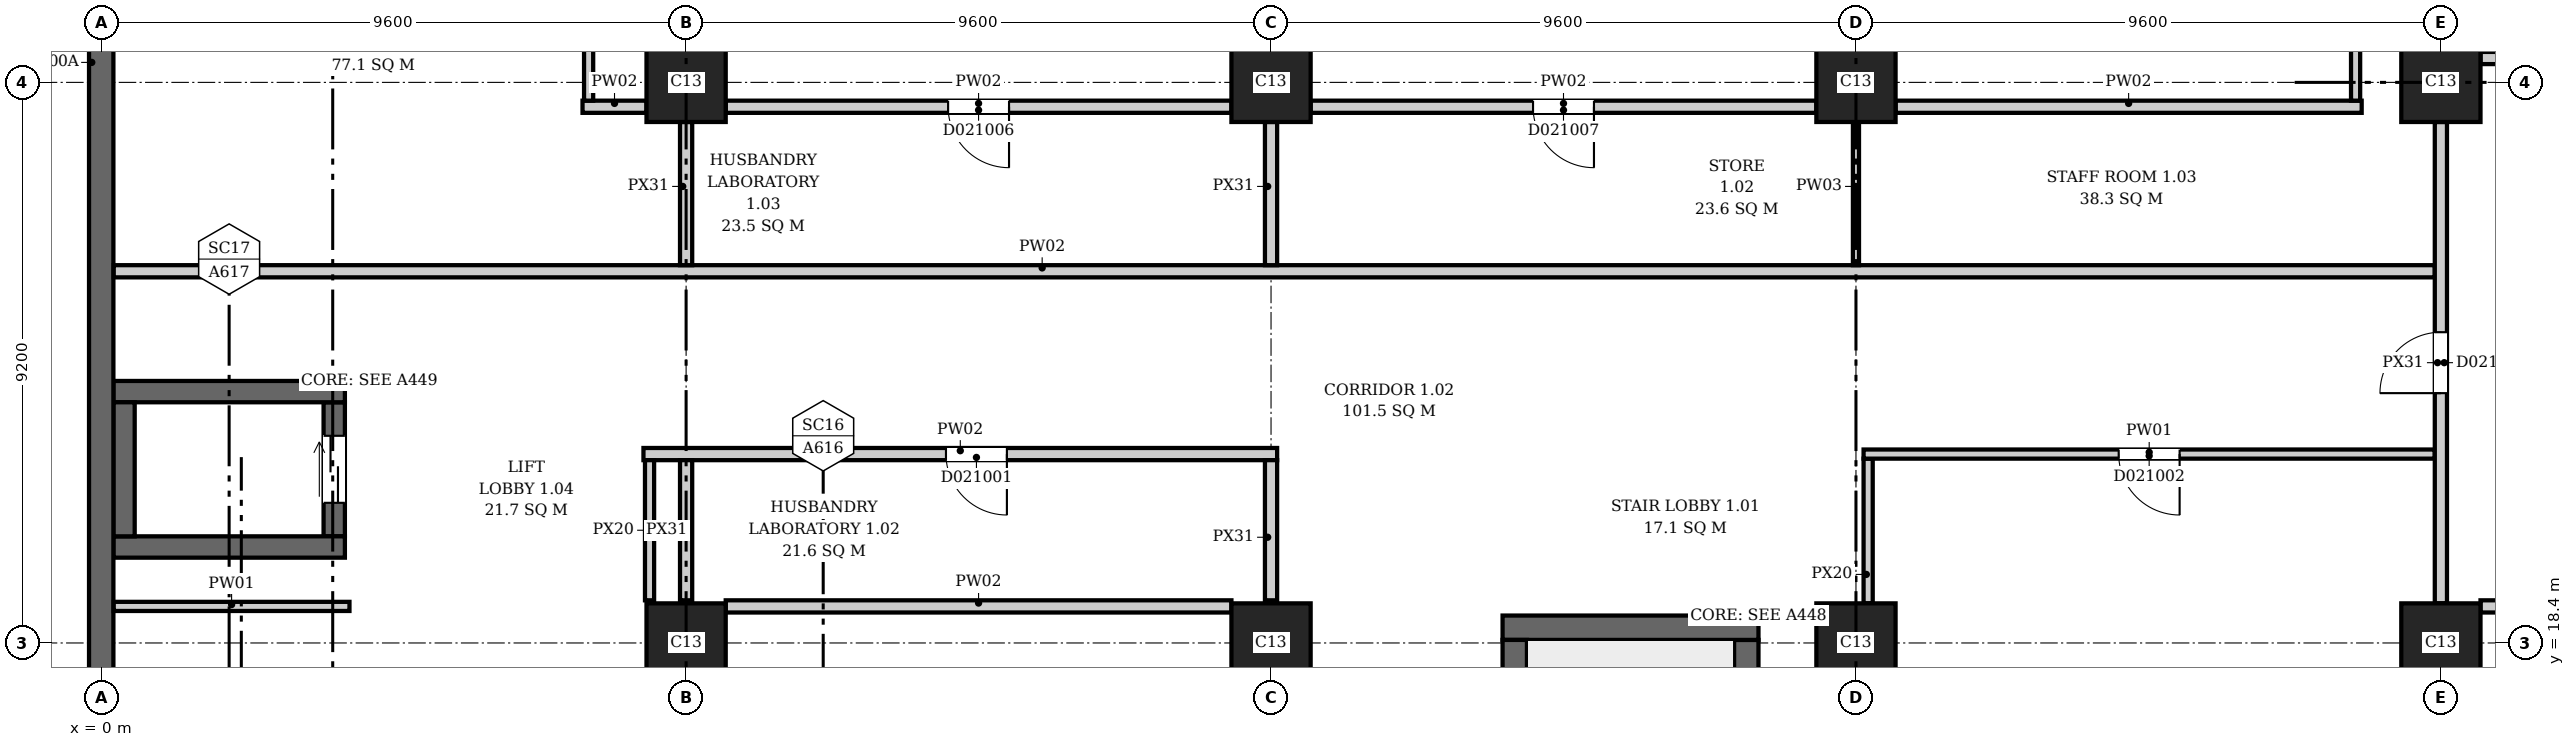
"""IFC4 building model, lengths in metres.
Left out: names, types, materials, properties, quantities, classifications, styles, units other than length and angle.
Written with IfcOpenShell. Run it as: python <this file> out.ifc"""

import sys

from ifc_helpers import new_model, si_unit, direction, frame, frame_2d, origin, origin_2d, place, context, subcontext, project, spatial, rectangle, extrude, element, fill, save


model = new_model("IFC4")
c1 = context("Model", 3, precision=1e-05, world=origin(), true_north=direction((0.0, 1.0)))
c2 = subcontext(c1, "Body", "Model", "MODEL_VIEW")
j1 = project(units=[si_unit("LENGTHUNIT", "METRE"), si_unit("PLANEANGLEUNIT", "RADIAN")], contexts=[c1])
p1 = place(None, origin())
s1 = spatial("IfcSite", under=j1, at=p1, CompositionType="ELEMENT")
p2 = place(p1, origin())
s2 = spatial("IfcBuilding", under=s1, at=p2, CompositionType="ELEMENT")
p3 = place(p2, frame((0.0, 0.0, 6.5)))
s3 = spatial("IfcBuildingStorey", under=s2, at=p3, CompositionType="ELEMENT", Elevation=6.5)
p4 = place(p3, frame((0.0, -0.2, 0.0), z_axis=(0.0, 0.0, 1.0), x_axis=(0.0, 1.0, 0.0)))
e1 = element("IfcWall", 1, at=p4, inside=s3, PredefinedType="SHEAR", context=c2, shape_type="SweptSolid", body=[
    extrude(rectangle(XDim=46.88, YDim=0.4, at=frame_2d((23.44, 0.0))), origin(), (0.0, 0.0, 1.0), 7.7),
])
p5 = place(p3, frame((23.0, 18.65, 0.0), z_axis=(0.0, 0.0, 1.0), x_axis=(1.0, 0.0, 0.0)))
e2 = element("IfcWall", 2, at=p5, inside=s3, PredefinedType="SHEAR", context=c2, shape_type="SweptSolid", body=[
    extrude(rectangle(XDim=4.2, YDim=0.4, at=frame_2d((2.1, 0.0))), origin(), (0.0, 0.0, 1.0), 7.7),
])
for number, where, z_axis, x_axis in (
    (3, (23.2, 11.85, 0.0), (0.0, 0.0, 1.0), (0.0, 1.0, 0.0)),
    (4, (27.0, 11.85, 0.0), (0.0, 0.0, 1.0), (0.0, 1.0, 0.0)),
):
    element("IfcWall", number, at=place(p3, frame(where, z_axis=z_axis, x_axis=x_axis)), inside=s3, PredefinedType="SHEAR", context=c2, shape_type="SweptSolid", body=[
        extrude(rectangle(XDim=6.6, YDim=0.4, at=frame_2d((3.3, 0.0))), origin(), (0.0, 0.0, 1.0), 7.7),
    ])
for number, where, z_axis, x_axis in (
    (5, (0.2, 19.975, 0.0), (0.0, 0.0, 1.0), (1.0, 0.0, 0.0)),
    (6, (0.2, 22.525, 0.0), (0.0, 0.0, 1.0), (1.0, 0.0, 0.0)),
):
    element("IfcWall", number, at=place(p3, frame(where, z_axis=z_axis, x_axis=x_axis)), inside=s3, PredefinedType="SHEAR", context=c2, shape_type="SweptSolid", body=[
        extrude(rectangle(XDim=3.8, YDim=0.35, at=frame_2d((1.9, 0.0))), origin(), (0.0, 0.0, 1.0), 7.7),
    ])
p6 = place(p3, frame((0.375, 20.15, 0.0), z_axis=(0.0, 0.0, 1.0), x_axis=(0.0, 1.0, 0.0)))
e7 = element("IfcWall", 7, at=p6, inside=s3, PredefinedType="SHEAR", context=c2, shape_type="SweptSolid", body=[
    extrude(rectangle(XDim=2.2, YDim=0.35, at=frame_2d((1.1, 0.0))), origin(), (0.0, 0.0, 1.0), 7.7),
])
p7 = place(p3, frame((3.825, 20.15, 0.0), z_axis=(0.0, 0.0, 1.0), x_axis=(0.0, 1.0, 0.0)))
e8 = element("IfcWall", 8, at=p7, inside=s3, PredefinedType="SHEAR", context=c2, shape_type="SweptSolid", body=[
    extrude(rectangle(XDim=2.2, YDim=0.35, at=frame_2d((1.1, 0.0))), origin(), (0.0, 0.0, 1.0), 7.7),
])
p8 = place(p7, frame((0.55, 0.0, 0.0)))
e9 = element("IfcOpeningElement", 9, at=p8, cuts=e8, PredefinedType="OPENING", context=c2, shape_type="SweptSolid", body=[
    extrude(rectangle(XDim=1.1, YDim=2.1, at=frame_2d((0.55, 1.05))), frame((0.0, 0.185, 0.0), z_axis=(0.0, -1.0, 0.0), x_axis=(1.0, 0.0, 0.0)), (0.0, 0.0, 1.0), 0.37),
])
for number, where, z_axis, x_axis in (
    (10, (9.6, 18.4, 0.0), (0.0, 0.0, 1.0), (1.0, 0.0, 0.0)),
    (11, (19.2, 18.4, 0.0), (0.0, 0.0, 1.0), (1.0, 0.0, 0.0)),
    (12, (28.8, 18.4, 0.0), (0.0, 0.0, 1.0), (1.0, 0.0, 0.0)),
    (13, (38.4, 18.4, 0.0), (0.0, 0.0, 1.0), (1.0, 0.0, 0.0)),
    (14, (9.6, 27.6, 0.0), (0.0, 0.0, 1.0), (1.0, 0.0, 0.0)),
    (15, (19.2, 27.6, 0.0), (0.0, 0.0, 1.0), (1.0, 0.0, 0.0)),
    (16, (28.8, 27.6, 0.0), (0.0, 0.0, 1.0), (1.0, 0.0, 0.0)),
    (17, (38.4, 27.6, 0.0), (0.0, 0.0, 1.0), (1.0, 0.0, 0.0)),
):
    element("IfcColumn", number, at=place(p3, frame(where, z_axis=z_axis, x_axis=x_axis)), inside=s3, PredefinedType="COLUMN", context=c2, shape_type="SweptSolid", body=[
        extrude(rectangle(XDim=1.3, YDim=1.3, at=origin_2d()), origin(), (0.0, 0.0, 1.0), 7.7),
    ])
p9 = place(p3, frame((0.206, 19.0, 0.0), z_axis=(0.0, 0.0, 1.0), x_axis=(1.0, 0.0, 0.0)))
e18 = element("IfcWall", 18, at=p9, inside=s3, PredefinedType="PARTITIONING", context=c2, shape_type="SweptSolid", body=[
    extrude(rectangle(XDim=3.869, YDim=0.15, at=frame_2d((1.935, 0.0))), origin(), (0.0, 0.0, 1.0), 7.35),
])
p10 = place(p3, frame((0.206, 24.5, 0.0), z_axis=(0.0, 0.0, 1.0), x_axis=(1.0, 0.0, 0.0)))
e19 = element("IfcWall", 19, at=p10, inside=s3, PredefinedType="PARTITIONING", context=c2, shape_type="SweptSolid", body=[
    extrude(rectangle(XDim=38.094, YDim=0.2, at=frame_2d((19.047, 0.0))), origin(), (0.0, 0.0, 1.0), 7.35),
])
p11 = place(p3, frame((7.9, 27.2, 0.0), z_axis=(0.0, 0.0, 1.0), x_axis=(1.0, 0.0, 0.0)))
e20 = element("IfcWall", 20, at=p11, inside=s3, PredefinedType="PARTITIONING", context=c2, shape_type="SweptSolid", body=[
    extrude(rectangle(XDim=1.05, YDim=0.2, at=frame_2d((0.525, 0.0))), origin(), (0.0, 0.0, 1.0), 7.35),
])
p12 = place(p3, frame((8.0, 27.3, 0.0), z_axis=(0.0, 0.0, 1.0), x_axis=(0.0, 1.0, 0.0)))
e21 = element("IfcWall", 21, at=p12, inside=s3, PredefinedType="PARTITIONING", context=c2, shape_type="SweptSolid", body=[
    extrude(rectangle(XDim=3.625, YDim=0.15, at=frame_2d((1.812, 0.0))), origin(), (0.0, 0.0, 1.0), 7.35),
])
p13 = place(p3, frame((8.9, 21.5, 0.0), z_axis=(0.0, 0.0, 1.0), x_axis=(1.0, 0.0, 0.0)))
e22 = element("IfcWall", 22, at=p13, inside=s3, PredefinedType="PARTITIONING", context=c2, shape_type="SweptSolid", body=[
    extrude(rectangle(XDim=10.4, YDim=0.2, at=frame_2d((5.2, 0.0))), origin(), (0.0, 0.0, 1.0), 7.35),
])
p14 = place(p13, frame((4.965, 0.0, 0.0)))
e23 = element("IfcOpeningElement", 23, at=p14, cuts=e22, PredefinedType="OPENING", context=c2, shape_type="SweptSolid", body=[
    extrude(rectangle(XDim=1.0, YDim=2.1, at=frame_2d((0.5, 1.05))), frame((0.0, 0.11, 0.0), z_axis=(0.0, -1.0, 0.0), x_axis=(1.0, 0.0, 0.0)), (0.0, 0.0, 1.0), 0.22),
])
p15 = place(p3, frame((9.0, 19.1, 0.0), z_axis=(0.0, 0.0, 1.0), x_axis=(0.0, 1.0, 0.0)))
e24 = element("IfcWall", 24, at=p15, inside=s3, PredefinedType="PARTITIONING", context=c2, shape_type="SweptSolid", body=[
    extrude(rectangle(XDim=2.3, YDim=0.15, at=frame_2d((1.15, 0.0))), origin(), (0.0, 0.0, 1.0), 6.95),
])
p16 = place(p3, frame((9.6, 19.1, 0.0), z_axis=(0.0, 0.0, 1.0), x_axis=(0.0, 1.0, 0.0)))
e25 = element("IfcWall", 25, at=p16, inside=s3, PredefinedType="PARTITIONING", context=c2, shape_type="SweptSolid", body=[
    extrude(rectangle(XDim=2.3, YDim=0.2, at=frame_2d((1.15, 0.0))), origin(), (0.0, 0.0, 1.0), 6.95),
])
p17 = place(p3, frame((9.6, 24.6, 0.0), z_axis=(0.0, 0.0, 1.0), x_axis=(0.0, 1.0, 0.0)))
e26 = element("IfcWall", 26, at=p17, inside=s3, PredefinedType="PARTITIONING", context=c2, shape_type="SweptSolid", body=[
    extrude(rectangle(XDim=2.35, YDim=0.2, at=frame_2d((1.175, 0.0))), origin(), (0.0, 0.0, 1.0), 6.95),
])
p18 = place(p3, frame((10.25, 19.0, 0.0), z_axis=(0.0, 0.0, 1.0), x_axis=(1.0, 0.0, 0.0)))
e27 = element("IfcWall", 27, at=p18, inside=s3, PredefinedType="PARTITIONING", context=c2, shape_type="SweptSolid", body=[
    extrude(rectangle(XDim=8.3, YDim=0.2, at=frame_2d((4.15, 0.0))), origin(), (0.0, 0.0, 1.0), 7.35),
])
p19 = place(p3, frame((10.25, 27.2, 0.0), z_axis=(0.0, 0.0, 1.0), x_axis=(1.0, 0.0, 0.0)))
e28 = element("IfcWall", 28, at=p19, inside=s3, PredefinedType="PARTITIONING", context=c2, shape_type="SweptSolid", body=[
    extrude(rectangle(XDim=8.3, YDim=0.2, at=frame_2d((4.15, 0.0))), origin(), (0.0, 0.0, 1.0), 7.35),
])
p20 = place(p19, frame((3.65, 0.0, 0.0)))
e29 = element("IfcOpeningElement", 29, at=p20, cuts=e28, PredefinedType="OPENING", context=c2, shape_type="SweptSolid", body=[
    extrude(rectangle(XDim=1.0, YDim=2.1, at=frame_2d((0.5, 1.05))), frame((0.0, 0.11, 0.0), z_axis=(0.0, -1.0, 0.0), x_axis=(1.0, 0.0, 0.0)), (0.0, 0.0, 1.0), 0.22),
])
p21 = place(p3, frame((19.2, 19.1, 0.0), z_axis=(0.0, 0.0, 1.0), x_axis=(0.0, 1.0, 0.0)))
e30 = element("IfcWall", 30, at=p21, inside=s3, PredefinedType="PARTITIONING", context=c2, shape_type="SweptSolid", body=[
    extrude(rectangle(XDim=2.3, YDim=0.2, at=frame_2d((1.15, 0.0))), origin(), (0.0, 0.0, 1.0), 6.95),
])
p22 = place(p3, frame((19.2, 24.6, 0.0), z_axis=(0.0, 0.0, 1.0), x_axis=(0.0, 1.0, 0.0)))
e31 = element("IfcWall", 31, at=p22, inside=s3, PredefinedType="PARTITIONING", context=c2, shape_type="SweptSolid", body=[
    extrude(rectangle(XDim=2.35, YDim=0.2, at=frame_2d((1.175, 0.0))), origin(), (0.0, 0.0, 1.0), 6.95),
])
p23 = place(p3, frame((19.85, 27.2, 0.0), z_axis=(0.0, 0.0, 1.0), x_axis=(1.0, 0.0, 0.0)))
e32 = element("IfcWall", 32, at=p23, inside=s3, PredefinedType="PARTITIONING", context=c2, shape_type="SweptSolid", body=[
    extrude(rectangle(XDim=8.3, YDim=0.2, at=frame_2d((4.15, 0.0))), origin(), (0.0, 0.0, 1.0), 7.35),
])
p24 = place(p23, frame((3.65, 0.0, 0.0)))
e33 = element("IfcOpeningElement", 33, at=p24, cuts=e32, PredefinedType="OPENING", context=c2, shape_type="SweptSolid", body=[
    extrude(rectangle(XDim=1.0, YDim=2.1, at=frame_2d((0.5, 1.05))), frame((0.0, 0.11, 0.0), z_axis=(0.0, -1.0, 0.0), x_axis=(1.0, 0.0, 0.0)), (0.0, 0.0, 1.0), 0.22),
])
p25 = place(p3, frame((28.8, 24.6, 0.0), z_axis=(0.0, 0.0, 1.0), x_axis=(0.0, 1.0, 0.0)))
e34 = element("IfcWall", 34, at=p25, inside=s3, PredefinedType="PARTITIONING", context=c2, shape_type="SweptSolid", body=[
    extrude(rectangle(XDim=2.35, YDim=0.1, at=frame_2d((1.175, 0.0))), origin(), (0.0, 0.0, 1.0), 6.95),
])
p26 = place(p3, frame((29.0, 19.05, 0.0), z_axis=(0.0, 0.0, 1.0), x_axis=(0.0, 1.0, 0.0)))
e35 = element("IfcWall", 35, at=p26, inside=s3, PredefinedType="PARTITIONING", context=c2, shape_type="SweptSolid", body=[
    extrude(rectangle(XDim=2.375, YDim=0.15, at=frame_2d((1.188, 0.0))), origin(), (0.0, 0.0, 1.0), 6.95),
])
p27 = place(p3, frame((28.925, 21.5, 0.0), z_axis=(0.0, 0.0, 1.0), x_axis=(1.0, 0.0, 0.0)))
e36 = element("IfcWall", 36, at=p27, inside=s3, PredefinedType="PARTITIONING", context=c2, shape_type="SweptSolid", body=[
    extrude(rectangle(XDim=9.375, YDim=0.15, at=frame_2d((4.688, 0.0))), origin(), (0.0, 0.0, 1.0), 7.35),
])
p28 = place(p27, frame((4.187, 0.0, 0.0)))
e37 = element("IfcOpeningElement", 37, at=p28, cuts=e36, PredefinedType="OPENING", context=c2, shape_type="SweptSolid", body=[
    extrude(rectangle(XDim=1.0, YDim=2.1, at=frame_2d((0.5, 1.05))), frame((0.0, 0.085, 0.0), z_axis=(0.0, -1.0, 0.0), x_axis=(1.0, 0.0, 0.0)), (0.0, 0.0, 1.0), 0.17),
])
p29 = place(p3, frame((29.45, 27.2, 0.0), z_axis=(0.0, 0.0, 1.0), x_axis=(1.0, 0.0, 0.0)))
e38 = element("IfcWall", 38, at=p29, inside=s3, PredefinedType="PARTITIONING", context=c2, shape_type="SweptSolid", body=[
    extrude(rectangle(XDim=7.65, YDim=0.2, at=frame_2d((3.825, 0.0))), origin(), (0.0, 0.0, 1.0), 7.35),
])
p30 = place(p3, frame((37.0, 27.3, 0.0), z_axis=(0.0, 0.0, 1.0), x_axis=(0.0, 1.0, 0.0)))
e39 = element("IfcWall", 39, at=p30, inside=s3, PredefinedType="PARTITIONING", context=c2, shape_type="SweptSolid", body=[
    extrude(rectangle(XDim=3.625, YDim=0.15, at=frame_2d((1.812, 0.0))), origin(), (0.0, 0.0, 1.0), 7.35),
])
p31 = place(p3, frame((38.4, 19.05, 0.0), z_axis=(0.0, 0.0, 1.0), x_axis=(0.0, 1.0, 0.0)))
e40 = element("IfcWall", 40, at=p31, inside=s3, PredefinedType="PARTITIONING", context=c2, shape_type="SweptSolid", body=[
    extrude(rectangle(XDim=7.9, YDim=0.2, at=frame_2d((3.95, 0.0))), origin(), (0.0, 0.0, 1.0), 6.95),
])
p32 = place(p31, frame((3.45, 0.0, 0.0)))
e41 = element("IfcOpeningElement", 41, at=p32, cuts=e40, PredefinedType="OPENING", context=c2, shape_type="SweptSolid", body=[
    extrude(rectangle(XDim=1.0, YDim=2.1, at=frame_2d((0.5, 1.05))), frame((0.0, 0.11, 0.0), z_axis=(0.0, -1.0, 0.0), x_axis=(1.0, 0.0, 0.0)), (0.0, 0.0, 1.0), 0.22),
])
for number, where, z_axis, x_axis in (
    (42, (39.05, 19.0, 0.0), (0.0, 0.0, 1.0), (1.0, 0.0, 0.0)),
    (43, (39.05, 28.0, 0.0), (0.0, 0.0, 1.0), (1.0, 0.0, 0.0)),
):
    element("IfcWall", number, at=place(p3, frame(where, z_axis=z_axis, x_axis=x_axis)), inside=s3, PredefinedType="PARTITIONING", context=c2, shape_type="SweptSolid", body=[
        extrude(rectangle(XDim=8.3, YDim=0.2, at=frame_2d((4.15, 0.0))), origin(), (0.0, 0.0, 1.0), 7.35),
    ])
p33 = place(p8, origin())
e44 = element("IfcDoor", 44, at=p33, inside=s3, OperationType="DOUBLE_DOOR_SLIDING", PredefinedType="DOOR", context=c2, shape_type="SweptSolid", body=[
    extrude(rectangle(XDim=1.1, YDim=2.1, at=frame_2d((0.55, 1.05))), frame((0.0, 0.025, 0.0), z_axis=(0.0, -1.0, 0.0), x_axis=(1.0, 0.0, 0.0)), (0.0, 0.0, 1.0), 0.05),
])
fill(e9, e44)
p34 = place(p14, origin())
e45 = element("IfcDoor", 45, at=p34, inside=s3, OperationType="SINGLE_SWING_RIGHT", PredefinedType="DOOR", context=c2, shape_type="SweptSolid", body=[
    extrude(rectangle(XDim=1.0, YDim=2.1, at=frame_2d((0.5, 1.05))), frame((0.0, 0.025, 0.0), z_axis=(0.0, -1.0, 0.0), x_axis=(1.0, 0.0, 0.0)), (0.0, 0.0, 1.0), 0.05),
])
fill(e23, e45)
p35 = place(p28, origin())
e46 = element("IfcDoor", 46, at=p35, inside=s3, OperationType="SINGLE_SWING_RIGHT", PredefinedType="DOOR", context=c2, shape_type="SweptSolid", body=[
    extrude(rectangle(XDim=1.0, YDim=2.1, at=frame_2d((0.5, 1.05))), frame((0.0, 0.025, 0.0), z_axis=(0.0, -1.0, 0.0), x_axis=(1.0, 0.0, 0.0)), (0.0, 0.0, 1.0), 0.05),
])
fill(e37, e46)
p36 = place(p20, origin())
e47 = element("IfcDoor", 47, at=p36, inside=s3, OperationType="SINGLE_SWING_RIGHT", PredefinedType="DOOR", context=c2, shape_type="SweptSolid", body=[
    extrude(rectangle(XDim=1.0, YDim=2.1, at=frame_2d((0.5, 1.05))), frame((0.0, 0.025, 0.0), z_axis=(0.0, -1.0, 0.0), x_axis=(1.0, 0.0, 0.0)), (0.0, 0.0, 1.0), 0.05),
])
fill(e29, e47)
p37 = place(p24, origin())
e48 = element("IfcDoor", 48, at=p37, inside=s3, OperationType="SINGLE_SWING_RIGHT", PredefinedType="DOOR", context=c2, shape_type="SweptSolid", body=[
    extrude(rectangle(XDim=1.0, YDim=2.1, at=frame_2d((0.5, 1.05))), frame((0.0, 0.025, 0.0), z_axis=(0.0, -1.0, 0.0), x_axis=(1.0, 0.0, 0.0)), (0.0, 0.0, 1.0), 0.05),
])
fill(e33, e48)
p38 = place(p32, origin())
e49 = element("IfcDoor", 49, at=p38, inside=s3, OperationType="SINGLE_SWING_LEFT", PredefinedType="DOOR", context=c2, shape_type="SweptSolid", body=[
    extrude(rectangle(XDim=1.0, YDim=2.1, at=frame_2d((0.5, 1.05))), frame((0.0, 0.025, 0.0), z_axis=(0.0, -1.0, 0.0), x_axis=(1.0, 0.0, 0.0)), (0.0, 0.0, 1.0), 0.05),
])
fill(e41, e49)
save(model, sys.argv[1])
